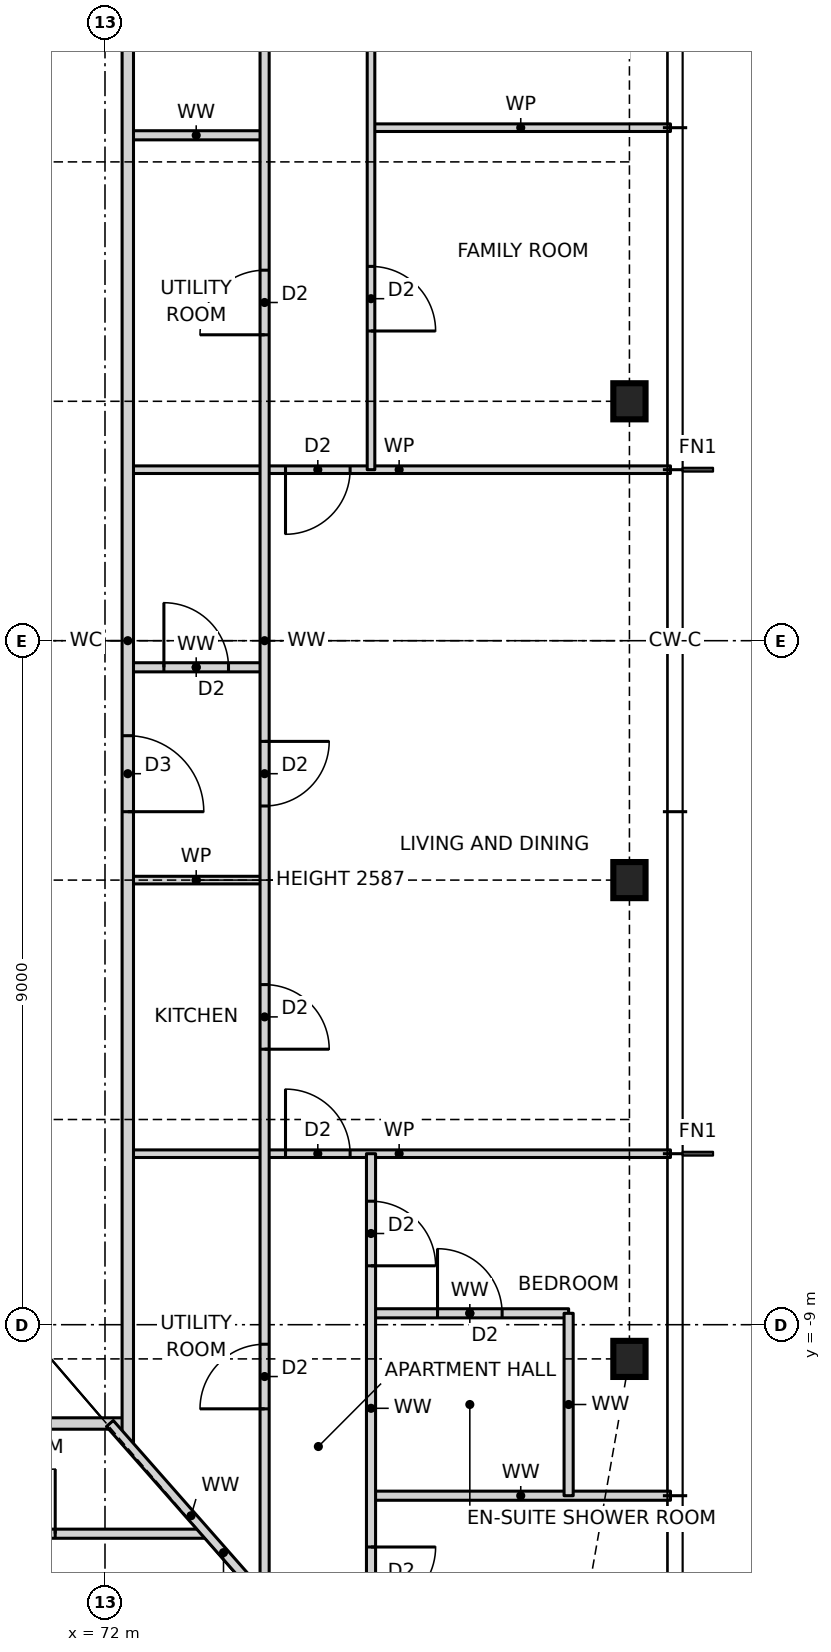
"""IFC4 building model, lengths in metres.
Left out: names, types, materials, properties, quantities, classifications, styles, units other than length and angle.
Written with IfcOpenShell. Run it as: python <this file> out.ifc"""

import sys

from ifc_helpers import new_model, si_unit, direction, frame, frame_2d, origin, origin_2d, place, context, subcontext, project, spatial, rectangle, i_section, extrude, element, fill, save


model = new_model("IFC4")
c1 = context("Model", 3, precision=1e-05, world=origin(), true_north=direction((0.0, 1.0)))
c2 = subcontext(c1, "Body", "Model", "MODEL_VIEW")
j1 = project(units=[si_unit("LENGTHUNIT", "METRE"), si_unit("PLANEANGLEUNIT", "RADIAN")], contexts=[c1])
p1 = place(None, origin())
s1 = spatial("IfcSite", under=j1, at=p1, CompositionType="ELEMENT")
p2 = place(p1, origin())
s2 = spatial("IfcBuilding", under=s1, at=p2, CompositionType="ELEMENT")
p3 = place(p2, frame((0.0, 0.0, 53.5)))
s3 = spatial("IfcBuildingStorey", under=s2, at=p3, CompositionType="ELEMENT", Elevation=53.5)
for number, where, z_axis, x_axis in (
    (1, (78.9, -9.45, 0.0), (0.0, 0.0, 1.0), (1.0, 0.0, 0.0)),
    (2, (78.9, -3.15, 0.0), (0.0, 0.0, 1.0), (1.0, 0.0, 0.0)),
    (3, (78.9, 3.15, 0.0), (0.0, 0.0, 1.0), (1.0, 0.0, 0.0)),
):
    element("IfcColumn", number, at=place(p3, frame(where, z_axis=z_axis, x_axis=x_axis)), inside=s3, PredefinedType="COLUMN", context=c2, shape_type="SweptSolid", body=[
        extrude(i_section(OverallWidth=0.424, OverallDepth=0.475, WebThickness=0.048, FlangeThickness=0.077, at=origin_2d()), origin(), (0.0, 0.0, 1.0), 3.5),
    ])
p4 = place(p3, frame((54.0, -11.75, 0.0), z_axis=(0.0, 0.0, 1.0), x_axis=(1.0, 0.0, 0.0)))
e4 = element("IfcWall", 4, at=p4, inside=s3, PredefinedType="PARTITIONING", context=c2, shape_type="SweptSolid", body=[
    extrude(rectangle(XDim=19.34, YDim=0.12, at=frame_2d((9.67, 0.0))), origin(), (0.0, 0.0, 1.0), 3.27),
])
p5 = place(p4, frame((1.375, 0.0, 0.0)))
e5 = element("IfcOpeningElement", 5, at=p5, cuts=e4, PredefinedType="OPENING", context=c2, shape_type="SweptSolid", body=[
    extrude(rectangle(XDim=0.85, YDim=2.1, at=frame_2d((0.425, 1.05))), frame((0.0, 0.07, 0.0), z_axis=(0.0, -1.0, 0.0), x_axis=(1.0, 0.0, 0.0)), (0.0, 0.0, 1.0), 0.14),
])
p6 = place(p4, frame((4.575, 0.0, 0.0)))
e6 = element("IfcOpeningElement", 6, at=p6, cuts=e4, PredefinedType="OPENING", context=c2, shape_type="SweptSolid", body=[
    extrude(rectangle(XDim=0.85, YDim=2.1, at=frame_2d((0.425, 1.05))), frame((0.0, 0.07, 0.0), z_axis=(0.0, -1.0, 0.0), x_axis=(1.0, 0.0, 0.0)), (0.0, 0.0, 1.0), 0.14),
])
p7 = place(p4, frame((11.325, 0.0, 0.0)))
e7 = element("IfcOpeningElement", 7, at=p7, cuts=e4, PredefinedType="OPENING", context=c2, shape_type="SweptSolid", body=[
    extrude(rectangle(XDim=0.85, YDim=2.1, at=frame_2d((0.425, 1.05))), frame((0.0, 0.07, 0.0), z_axis=(0.0, -1.0, 0.0), x_axis=(1.0, 0.0, 0.0)), (0.0, 0.0, 1.0), 0.14),
])
p8 = place(p4, frame((16.495, 0.0, 0.0)))
e8 = element("IfcOpeningElement", 8, at=p8, cuts=e4, PredefinedType="OPENING", context=c2, shape_type="SweptSolid", body=[
    extrude(rectangle(XDim=0.85, YDim=2.1, at=frame_2d((0.425, 1.05))), frame((0.0, 0.07, 0.0), z_axis=(0.0, -1.0, 0.0), x_axis=(1.0, 0.0, 0.0)), (0.0, 0.0, 1.0), 0.14),
])
p9 = place(p3, frame((75.5, -11.25, 0.0), z_axis=(0.0, 0.0, 1.0), x_axis=(1.0, 0.0, 0.0)))
e9 = element("IfcWall", 9, at=p9, inside=s3, PredefinedType="PARTITIONING", context=c2, shape_type="SweptSolid", body=[
    extrude(rectangle(XDim=3.94, YDim=0.12, at=frame_2d((1.97, 0.0))), origin(), (0.0, 0.0, 1.0), 3.27),
])
p10 = place(p3, frame((53.7, -10.3, 0.0), z_axis=(0.0, 0.0, 1.0), x_axis=(1.0, 0.0, 0.0)))
e10 = element("IfcWall", 10, at=p10, inside=s3, PredefinedType="PARTITIONING", context=c2, shape_type="SweptSolid", body=[
    extrude(rectangle(XDim=18.6, YDim=0.15, at=frame_2d((9.3, 0.0))), origin(), (0.0, 0.0, 1.0), 3.27),
])
p11 = place(p10, frame((4.8, 0.0, 0.0)))
e11 = element("IfcOpeningElement", 11, at=p11, cuts=e10, PredefinedType="OPENING", context=c2, shape_type="SweptSolid", body=[
    extrude(rectangle(XDim=1.0, YDim=2.1, at=frame_2d((0.5, 1.05))), frame((0.0, 0.085, 0.0), z_axis=(0.0, -1.0, 0.0), x_axis=(1.0, 0.0, 0.0)), (0.0, 0.0, 1.0), 0.17),
])
p12 = place(p3, frame((75.5, -8.85, 0.0), z_axis=(0.0, 0.0, 1.0), x_axis=(1.0, 0.0, 0.0)))
e12 = element("IfcWall", 12, at=p12, inside=s3, PredefinedType="PARTITIONING", context=c2, shape_type="SweptSolid", body=[
    extrude(rectangle(XDim=2.6, YDim=0.12, at=frame_2d((1.3, 0.0))), origin(), (0.0, 0.0, 1.0), 3.27),
])
p13 = place(p12, frame((0.875, 0.0, 0.0)))
e13 = element("IfcOpeningElement", 13, at=p13, cuts=e12, PredefinedType="OPENING", context=c2, shape_type="SweptSolid", body=[
    extrude(rectangle(XDim=0.85, YDim=2.1, at=frame_2d((0.425, 1.05))), frame((0.0, 0.07, 0.0), z_axis=(0.0, -1.0, 0.0), x_axis=(1.0, 0.0, 0.0)), (0.0, 0.0, 1.0), 0.14),
])
p14 = place(p3, frame((72.3, -6.75, 0.0), z_axis=(0.0, 0.0, 1.0), x_axis=(1.0, 0.0, 0.0)))
e14 = element("IfcWall", 14, at=p14, inside=s3, PredefinedType="PARTITIONING", context=c2, shape_type="SweptSolid", body=[
    extrude(rectangle(XDim=7.14, YDim=0.1, at=frame_2d((3.57, 0.0))), origin(), (0.0, 0.0, 1.0), 3.27),
])
p15 = place(p14, frame((2.075, 0.0, 0.0)))
e15 = element("IfcOpeningElement", 15, at=p15, cuts=e14, PredefinedType="OPENING", context=c2, shape_type="SweptSolid", body=[
    extrude(rectangle(XDim=0.85, YDim=2.1, at=frame_2d((0.425, 1.05))), frame((0.0, 0.06, 0.0), z_axis=(0.0, -1.0, 0.0), x_axis=(1.0, 0.0, 0.0)), (0.0, 0.0, 1.0), 0.12),
])
p16 = place(p3, frame((72.3, -3.15, 0.0), z_axis=(0.0, 0.0, 1.0), x_axis=(1.0, 0.0, 0.0)))
e16 = element("IfcWall", 16, at=p16, inside=s3, PredefinedType="PARTITIONING", context=c2, shape_type="SweptSolid", body=[
    extrude(rectangle(XDim=1.8, YDim=0.1, at=frame_2d((0.9, 0.0))), origin(), (0.0, 0.0, 1.0), 2.587),
])
p17 = place(p3, frame((72.3, -0.35, 0.0), z_axis=(0.0, 0.0, 1.0), x_axis=(1.0, 0.0, 0.0)))
e17 = element("IfcWall", 17, at=p17, inside=s3, PredefinedType="PARTITIONING", context=c2, shape_type="SweptSolid", body=[
    extrude(rectangle(XDim=1.8, YDim=0.12, at=frame_2d((0.9, 0.0))), origin(), (0.0, 0.0, 1.0), 3.27),
])
p18 = place(p17, frame((0.475, 0.0, 0.0)))
e18 = element("IfcOpeningElement", 18, at=p18, cuts=e17, PredefinedType="OPENING", context=c2, shape_type="SweptSolid", body=[
    extrude(rectangle(XDim=0.85, YDim=2.1, at=frame_2d((0.425, 1.05))), frame((0.0, 0.07, 0.0), z_axis=(0.0, -1.0, 0.0), x_axis=(1.0, 0.0, 0.0)), (0.0, 0.0, 1.0), 0.14),
])
p19 = place(p3, frame((72.3, 2.25, 0.0), z_axis=(0.0, 0.0, 1.0), x_axis=(1.0, 0.0, 0.0)))
e19 = element("IfcWall", 19, at=p19, inside=s3, PredefinedType="PARTITIONING", context=c2, shape_type="SweptSolid", body=[
    extrude(rectangle(XDim=7.14, YDim=0.1, at=frame_2d((3.57, 0.0))), origin(), (0.0, 0.0, 1.0), 3.27),
])
p20 = place(p19, frame((2.075, 0.0, 0.0)))
e20 = element("IfcOpeningElement", 20, at=p20, cuts=e19, PredefinedType="OPENING", context=c2, shape_type="SweptSolid", body=[
    extrude(rectangle(XDim=0.85, YDim=2.1, at=frame_2d((0.425, 1.05))), frame((0.0, 0.06, 0.0), z_axis=(0.0, -1.0, 0.0), x_axis=(1.0, 0.0, 0.0)), (0.0, 0.0, 1.0), 0.12),
])
p21 = place(p3, frame((72.3, 6.65, 0.0), z_axis=(0.0, 0.0, 1.0), x_axis=(1.0, 0.0, 0.0)))
e21 = element("IfcWall", 21, at=p21, inside=s3, PredefinedType="PARTITIONING", context=c2, shape_type="SweptSolid", body=[
    extrude(rectangle(XDim=1.8, YDim=0.12, at=frame_2d((0.9, 0.0))), origin(), (0.0, 0.0, 1.0), 3.27),
])
p22 = place(p3, frame((75.5, 6.75, 0.0), z_axis=(0.0, 0.0, 1.0), x_axis=(1.0, 0.0, 0.0)))
e22 = element("IfcWall", 22, at=p22, inside=s3, PredefinedType="PARTITIONING", context=c2, shape_type="SweptSolid", body=[
    extrude(rectangle(XDim=3.94, YDim=0.1, at=frame_2d((1.97, 0.0))), origin(), (0.0, 0.0, 1.0), 3.27),
])
p23 = place(p3, frame((78.1, -11.25, 0.0), z_axis=(0.0, 0.0, 1.0), x_axis=(0.0, 1.0, 0.0)))
e23 = element("IfcWall", 23, at=p23, inside=s3, PredefinedType="PARTITIONING", context=c2, shape_type="SweptSolid", body=[
    extrude(rectangle(XDim=2.4, YDim=0.12, at=frame_2d((1.2, 0.0))), origin(), (0.0, 0.0, 1.0), 3.27),
])
p24 = place(p3, frame((75.5, -13.45, 0.0), z_axis=(0.0, 0.0, 1.0), x_axis=(0.0, 1.0, 0.0)))
e24 = element("IfcWall", 24, at=p24, inside=s3, PredefinedType="PARTITIONING", context=c2, shape_type="SweptSolid", body=[
    extrude(rectangle(XDim=6.7, YDim=0.12, at=frame_2d((3.35, 0.0))), origin(), (0.0, 0.0, 1.0), 3.27),
])
p25 = place(p24, frame((5.225, 0.0, 0.0)))
e25 = element("IfcOpeningElement", 25, at=p25, cuts=e24, PredefinedType="OPENING", context=c2, shape_type="SweptSolid", body=[
    extrude(rectangle(XDim=0.85, YDim=2.1, at=frame_2d((0.425, 1.05))), frame((0.0, 0.07, 0.0), z_axis=(0.0, -1.0, 0.0), x_axis=(1.0, 0.0, 0.0)), (0.0, 0.0, 1.0), 0.14),
])
p26 = place(p24, frame((0.675, 0.0, 0.0)))
e26 = element("IfcOpeningElement", 26, at=p26, cuts=e24, PredefinedType="OPENING", context=c2, shape_type="SweptSolid", body=[
    extrude(rectangle(XDim=0.85, YDim=2.1, at=frame_2d((0.425, 1.05))), frame((0.0, 0.07, 0.0), z_axis=(0.0, -1.0, 0.0), x_axis=(1.0, 0.0, 0.0)), (0.0, 0.0, 1.0), 0.14),
])
p27 = place(p3, frame((75.5, 2.25, 0.0), z_axis=(0.0, 0.0, 1.0), x_axis=(0.0, 1.0, 0.0)))
e27 = element("IfcWall", 27, at=p27, inside=s3, PredefinedType="PARTITIONING", context=c2, shape_type="SweptSolid", body=[
    extrude(rectangle(XDim=11.2, YDim=0.1, at=frame_2d((5.6, 0.0))), origin(), (0.0, 0.0, 1.0), 3.27),
])
p28 = place(p27, frame((1.825, 0.0, 0.0)))
e28 = element("IfcOpeningElement", 28, at=p28, cuts=e27, PredefinedType="OPENING", context=c2, shape_type="SweptSolid", body=[
    extrude(rectangle(XDim=0.85, YDim=2.1, at=frame_2d((0.425, 1.05))), frame((0.0, 0.06, 0.0), z_axis=(0.0, -1.0, 0.0), x_axis=(1.0, 0.0, 0.0)), (0.0, 0.0, 1.0), 0.12),
])
p29 = place(p27, frame((6.325, 0.0, 0.0)))
e29 = element("IfcOpeningElement", 29, at=p29, cuts=e27, PredefinedType="OPENING", context=c2, shape_type="SweptSolid", body=[
    extrude(rectangle(XDim=0.85, YDim=2.1, at=frame_2d((0.425, 1.05))), frame((0.0, 0.06, 0.0), z_axis=(0.0, -1.0, 0.0), x_axis=(1.0, 0.0, 0.0)), (0.0, 0.0, 1.0), 0.12),
])
p30 = place(p27, frame((9.675, 0.0, 0.0)))
e30 = element("IfcOpeningElement", 30, at=p30, cuts=e27, PredefinedType="OPENING", context=c2, shape_type="SweptSolid", body=[
    extrude(rectangle(XDim=0.85, YDim=2.1, at=frame_2d((0.425, 1.05))), frame((0.0, 0.06, 0.0), z_axis=(0.0, -1.0, 0.0), x_axis=(1.0, 0.0, 0.0)), (0.0, 0.0, 1.0), 0.12),
])
p31 = place(p3, frame((74.1, -12.614, 0.0), z_axis=(0.0, 0.0, 1.0), x_axis=(0.0, 1.0, 0.0)))
e31 = element("IfcWall", 31, at=p31, inside=s3, PredefinedType="PARTITIONING", context=c2, shape_type="SweptSolid", body=[
    extrude(rectangle(XDim=25.228, YDim=0.12, at=frame_2d((12.614, 0.0))), origin(), (0.0, 0.0, 1.0), 3.27),
])
p32 = place(p31, frame((7.239, 0.0, 0.0)))
e32 = element("IfcOpeningElement", 32, at=p32, cuts=e31, PredefinedType="OPENING", context=c2, shape_type="SweptSolid", body=[
    extrude(rectangle(XDim=0.85, YDim=2.1, at=frame_2d((0.425, 1.05))), frame((0.0, 0.07, 0.0), z_axis=(0.0, -1.0, 0.0), x_axis=(1.0, 0.0, 0.0)), (0.0, 0.0, 1.0), 0.14),
])
p33 = place(p31, frame((10.439, 0.0, 0.0)))
e33 = element("IfcOpeningElement", 33, at=p33, cuts=e31, PredefinedType="OPENING", context=c2, shape_type="SweptSolid", body=[
    extrude(rectangle(XDim=0.85, YDim=2.1, at=frame_2d((0.425, 1.05))), frame((0.0, 0.07, 0.0), z_axis=(0.0, -1.0, 0.0), x_axis=(1.0, 0.0, 0.0)), (0.0, 0.0, 1.0), 0.14),
])
p34 = place(p31, frame((2.507, 0.0, 0.0)))
e34 = element("IfcOpeningElement", 34, at=p34, cuts=e31, PredefinedType="OPENING", context=c2, shape_type="SweptSolid", body=[
    extrude(rectangle(XDim=0.85, YDim=2.1, at=frame_2d((0.425, 1.05))), frame((0.0, 0.07, 0.0), z_axis=(0.0, -1.0, 0.0), x_axis=(1.0, 0.0, 0.0)), (0.0, 0.0, 1.0), 0.14),
])
p35 = place(p31, frame((16.639, 0.0, 0.0)))
e35 = element("IfcOpeningElement", 35, at=p35, cuts=e31, PredefinedType="OPENING", context=c2, shape_type="SweptSolid", body=[
    extrude(rectangle(XDim=0.85, YDim=2.1, at=frame_2d((0.425, 1.05))), frame((0.0, 0.07, 0.0), z_axis=(0.0, -1.0, 0.0), x_axis=(1.0, 0.0, 0.0)), (0.0, 0.0, 1.0), 0.14),
])
p36 = place(p31, frame((21.821, 0.0, 0.0)))
e36 = element("IfcOpeningElement", 36, at=p36, cuts=e31, PredefinedType="OPENING", context=c2, shape_type="SweptSolid", body=[
    extrude(rectangle(XDim=0.85, YDim=2.1, at=frame_2d((0.425, 1.05))), frame((0.0, 0.07, 0.0), z_axis=(0.0, -1.0, 0.0), x_axis=(1.0, 0.0, 0.0)), (0.0, 0.0, 1.0), 0.14),
])
p37 = place(p3, frame((72.3, -10.568, 0.0), z_axis=(0.0, 0.0, 1.0), x_axis=(0.0, 1.0, 0.0)))
e37 = element("IfcWall", 37, at=p37, inside=s3, PredefinedType="PARTITIONING", context=c2, shape_type="SweptSolid", body=[
    extrude(rectangle(XDim=21.136, YDim=0.15, at=frame_2d((10.568, 0.0))), origin(), (0.0, 0.0, 1.0), 3.27),
])
p38 = place(p37, frame((8.318, 0.0, 0.0)))
e38 = element("IfcOpeningElement", 38, at=p38, cuts=e37, PredefinedType="OPENING", context=c2, shape_type="SweptSolid", body=[
    extrude(rectangle(XDim=1.0, YDim=2.1, at=frame_2d((0.5, 1.05))), frame((0.0, 0.085, 0.0), z_axis=(0.0, -1.0, 0.0), x_axis=(1.0, 0.0, 0.0)), (0.0, 0.0, 1.0), 0.17),
])
p39 = place(p3, frame((74.2, -12.727, 0.0), z_axis=(0.0, 0.0, 1.0), x_axis=(-0.660667046586, 0.75067906162, 0.0)))
e39 = element("IfcWall", 39, at=p39, inside=s3, PredefinedType="PARTITIONING", context=c2, shape_type="SweptSolid", body=[
    extrude(rectangle(XDim=3.233, YDim=0.12, at=frame_2d((1.617, 0.0))), origin(), (0.0, 0.0, 1.0), 2.429),
])
p40 = place(p8, origin())
e40 = element("IfcDoor", 40, at=p40, inside=s3, OperationType="SINGLE_SWING_RIGHT", PredefinedType="DOOR", context=c2, shape_type="SweptSolid", body=[
    extrude(rectangle(XDim=0.85, YDim=2.1, at=frame_2d((0.425, 1.05))), frame((0.0, 0.025, 0.0), z_axis=(0.0, -1.0, 0.0), x_axis=(1.0, 0.0, 0.0)), (0.0, 0.0, 1.0), 0.05),
])
fill(e8, e40)
p41 = place(p32, frame((0.85, 0.0, 0.0), z_axis=(0.0, 0.0, 1.0), x_axis=(-1.0, 0.0, 0.0)))
e41 = element("IfcDoor", 41, at=p41, inside=s3, OperationType="SINGLE_SWING_RIGHT", PredefinedType="DOOR", context=c2, shape_type="SweptSolid", body=[
    extrude(rectangle(XDim=0.85, YDim=2.1, at=frame_2d((0.425, 1.05))), frame((0.0, 0.025, 0.0), z_axis=(0.0, -1.0, 0.0), x_axis=(1.0, 0.0, 0.0)), (0.0, 0.0, 1.0), 0.05),
])
fill(e32, e41)
p42 = place(p38, frame((1.0, 0.0, 0.0), z_axis=(0.0, 0.0, 1.0), x_axis=(-1.0, 0.0, 0.0)))
e42 = element("IfcDoor", 42, at=p42, inside=s3, OperationType="SINGLE_SWING_RIGHT", PredefinedType="DOOR", context=c2, shape_type="SweptSolid", body=[
    extrude(rectangle(XDim=1.0, YDim=2.1, at=frame_2d((0.5, 1.05))), frame((0.0, 0.025, 0.0), z_axis=(0.0, -1.0, 0.0), x_axis=(1.0, 0.0, 0.0)), (0.0, 0.0, 1.0), 0.05),
])
fill(e38, e42)
p43 = place(p33, frame((0.85, 0.0, 0.0), z_axis=(0.0, 0.0, 1.0), x_axis=(-1.0, 0.0, 0.0)))
e43 = element("IfcDoor", 43, at=p43, inside=s3, OperationType="SINGLE_SWING_LEFT", PredefinedType="DOOR", context=c2, shape_type="SweptSolid", body=[
    extrude(rectangle(XDim=0.85, YDim=2.1, at=frame_2d((0.425, 1.05))), frame((0.0, 0.025, 0.0), z_axis=(0.0, -1.0, 0.0), x_axis=(1.0, 0.0, 0.0)), (0.0, 0.0, 1.0), 0.05),
])
fill(e33, e43)
p44 = place(p18, origin())
e44 = element("IfcDoor", 44, at=p44, inside=s3, OperationType="SINGLE_SWING_LEFT", PredefinedType="DOOR", context=c2, shape_type="SweptSolid", body=[
    extrude(rectangle(XDim=0.85, YDim=2.1, at=frame_2d((0.425, 1.05))), frame((0.0, 0.025, 0.0), z_axis=(0.0, -1.0, 0.0), x_axis=(1.0, 0.0, 0.0)), (0.0, 0.0, 1.0), 0.05),
])
fill(e18, e44)
p45 = place(p15, origin())
e45 = element("IfcDoor", 45, at=p45, inside=s3, OperationType="SINGLE_SWING_LEFT", PredefinedType="DOOR", context=c2, shape_type="SweptSolid", body=[
    extrude(rectangle(XDim=0.85, YDim=2.1, at=frame_2d((0.425, 1.05))), frame((0.0, 0.025, 0.0), z_axis=(0.0, -1.0, 0.0), x_axis=(1.0, 0.0, 0.0)), (0.0, 0.0, 1.0), 0.05),
])
fill(e15, e45)
p46 = place(p13, origin())
e46 = element("IfcDoor", 46, at=p46, inside=s3, OperationType="SINGLE_SWING_LEFT", PredefinedType="DOOR", context=c2, shape_type="SweptSolid", body=[
    extrude(rectangle(XDim=0.85, YDim=2.1, at=frame_2d((0.425, 1.05))), frame((0.0, 0.025, 0.0), z_axis=(0.0, -1.0, 0.0), x_axis=(1.0, 0.0, 0.0)), (0.0, 0.0, 1.0), 0.05),
])
fill(e13, e46)
p47 = place(p25, frame((0.85, 0.0, 0.0), z_axis=(0.0, 0.0, 1.0), x_axis=(-1.0, 0.0, 0.0)))
e47 = element("IfcDoor", 47, at=p47, inside=s3, OperationType="SINGLE_SWING_RIGHT", PredefinedType="DOOR", context=c2, shape_type="SweptSolid", body=[
    extrude(rectangle(XDim=0.85, YDim=2.1, at=frame_2d((0.425, 1.05))), frame((0.0, 0.025, 0.0), z_axis=(0.0, -1.0, 0.0), x_axis=(1.0, 0.0, 0.0)), (0.0, 0.0, 1.0), 0.05),
])
fill(e25, e47)
p48 = place(p26, frame((0.85, 0.0, 0.0), z_axis=(0.0, 0.0, 1.0), x_axis=(-1.0, 0.0, 0.0)))
e48 = element("IfcDoor", 48, at=p48, inside=s3, OperationType="SINGLE_SWING_LEFT", PredefinedType="DOOR", context=c2, shape_type="SweptSolid", body=[
    extrude(rectangle(XDim=0.85, YDim=2.1, at=frame_2d((0.425, 1.05))), frame((0.0, 0.025, 0.0), z_axis=(0.0, -1.0, 0.0), x_axis=(1.0, 0.0, 0.0)), (0.0, 0.0, 1.0), 0.05),
])
fill(e26, e48)
p49 = place(p34, origin())
e49 = element("IfcDoor", 49, at=p49, inside=s3, OperationType="SINGLE_SWING_LEFT", PredefinedType="DOOR", context=c2, shape_type="SweptSolid", body=[
    extrude(rectangle(XDim=0.85, YDim=2.1, at=frame_2d((0.425, 1.05))), frame((0.0, 0.025, 0.0), z_axis=(0.0, -1.0, 0.0), x_axis=(1.0, 0.0, 0.0)), (0.0, 0.0, 1.0), 0.05),
])
fill(e34, e49)
p50 = place(p20, frame((0.85, 0.0, 0.0), z_axis=(0.0, 0.0, 1.0), x_axis=(-1.0, 0.0, 0.0)))
e50 = element("IfcDoor", 50, at=p50, inside=s3, OperationType="SINGLE_SWING_RIGHT", PredefinedType="DOOR", context=c2, shape_type="SweptSolid", body=[
    extrude(rectangle(XDim=0.85, YDim=2.1, at=frame_2d((0.425, 1.05))), frame((0.0, 0.025, 0.0), z_axis=(0.0, -1.0, 0.0), x_axis=(1.0, 0.0, 0.0)), (0.0, 0.0, 1.0), 0.05),
])
fill(e20, e50)
p51 = place(p28, frame((0.85, 0.0, 0.0), z_axis=(0.0, 0.0, 1.0), x_axis=(-1.0, 0.0, 0.0)))
e51 = element("IfcDoor", 51, at=p51, inside=s3, OperationType="SINGLE_SWING_RIGHT", PredefinedType="DOOR", context=c2, shape_type="SweptSolid", body=[
    extrude(rectangle(XDim=0.85, YDim=2.1, at=frame_2d((0.425, 1.05))), frame((0.0, 0.025, 0.0), z_axis=(0.0, -1.0, 0.0), x_axis=(1.0, 0.0, 0.0)), (0.0, 0.0, 1.0), 0.05),
])
fill(e28, e51)
p52 = place(p35, origin())
e52 = element("IfcDoor", 52, at=p52, inside=s3, OperationType="SINGLE_SWING_LEFT", PredefinedType="DOOR", context=c2, shape_type="SweptSolid", body=[
    extrude(rectangle(XDim=0.85, YDim=2.1, at=frame_2d((0.425, 1.05))), frame((0.0, 0.025, 0.0), z_axis=(0.0, -1.0, 0.0), x_axis=(1.0, 0.0, 0.0)), (0.0, 0.0, 1.0), 0.05),
])
fill(e35, e52)
save(model, sys.argv[1])
